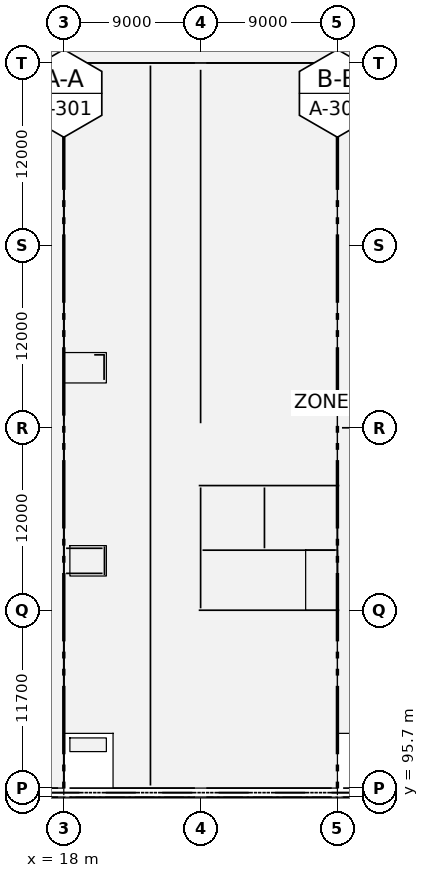
"""IFC4 building model, lengths in metres.
Left out: names, types, materials, properties, quantities, classifications, styles, units other than length and angle.
Written with IfcOpenShell. Run it as: python <this file> out.ifc"""

import sys

from ifc_helpers import new_model, si_unit, direction, frame, frame_2d, origin, origin_2d, place, context, subcontext, project, spatial, rectangle, extrude, element, fill, save


model = new_model("IFC4")
c1 = context("Model", 3, precision=1e-05, world=origin(), true_north=direction((0.0, 1.0)))
c2 = subcontext(c1, "Body", "Model", "MODEL_VIEW")
j1 = project(units=[si_unit("LENGTHUNIT", "METRE"), si_unit("PLANEANGLEUNIT", "RADIAN")], contexts=[c1])
p1 = place(None, origin())
s1 = spatial("IfcSite", under=j1, at=p1, CompositionType="ELEMENT")
p2 = place(p1, origin())
s2 = spatial("IfcBuilding", under=s1, at=p2, CompositionType="ELEMENT")
p3 = place(p2, origin())
s3 = spatial("IfcBuildingStorey", under=s2, at=p3, CompositionType="ELEMENT", Elevation=0.0)
p4 = place(p3, frame((18.0, 48.3, -0.5), z_axis=(0.0, 0.0, 1.0), x_axis=(0.0, 1.0, 0.0)))
e1 = element("IfcWall", 1, at=p4, inside=s3, PredefinedType="SOLIDWALL", context=c2, shape_type="SweptSolid", body=[
    extrude(rectangle(XDim=47.4, YDim=0.3, at=frame_2d((23.7, 0.0))), origin(), (0.0, 0.0, 1.0), 1.725),
])
p5 = place(p3, frame((18.0, 96.3, -0.5), z_axis=(0.0, 0.0, 1.0), x_axis=(0.0, 1.0, 0.0)))
e2 = element("IfcWall", 2, at=p5, inside=s3, PredefinedType="SOLIDWALL", context=c2, shape_type="SweptSolid", body=[
    extrude(rectangle(XDim=47.7, YDim=0.3, at=frame_2d((23.85, 0.0))), origin(), (0.0, 0.0, 1.0), 1.725),
])
for number, where, z_axis, x_axis in (
    (3, (18.0, 95.7, -0.5), (0.0, 0.0, 1.0), (1.0, 0.0, 0.0)),
    (4, (18.0, 96.3, -0.5), (0.0, 0.0, 1.0), (1.0, 0.0, 0.0)),
):
    element("IfcColumn", number, at=place(p3, frame(where, z_axis=z_axis, x_axis=x_axis)), inside=s3, PredefinedType="COLUMN", context=c2, shape_type="SweptSolid", body=[
        extrude(rectangle(XDim=0.75, YDim=0.55, at=origin_2d()), origin(), (0.0, 0.0, 1.0), 6.8),
    ])
for number, where, z_axis, x_axis in (
    (5, (18.0, 108.0, -0.5), (0.0, 0.0, 1.0), (1.0, 0.0, 0.0)),
    (6, (18.0, 120.0, -0.5), (0.0, 0.0, 1.0), (1.0, 0.0, 0.0)),
    (7, (18.0, 132.0, -0.5), (0.0, 0.0, 1.0), (1.0, 0.0, 0.0)),
    (8, (18.0, 144.0, -0.5), (0.0, 0.0, 1.0), (1.0, 0.0, 0.0)),
):
    element("IfcColumn", number, at=place(p3, frame(where, z_axis=z_axis, x_axis=x_axis)), inside=s3, PredefinedType="COLUMN", context=c2, shape_type="SweptSolid", body=[
        extrude(rectangle(XDim=0.75, YDim=0.75, at=origin_2d()), origin(), (0.0, 0.0, 1.0), 6.8),
    ])
for number, where, z_axis, x_axis in (
    (9, (27.0, 95.7, -0.5), (0.0, 0.0, 1.0), (1.0, 0.0, 0.0)),
    (10, (27.0, 96.3, -0.5), (0.0, 0.0, 1.0), (1.0, 0.0, 0.0)),
):
    element("IfcColumn", number, at=place(p3, frame(where, z_axis=z_axis, x_axis=x_axis)), inside=s3, PredefinedType="COLUMN", context=c2, shape_type="SweptSolid", body=[
        extrude(rectangle(XDim=0.75, YDim=0.55, at=origin_2d()), origin(), (0.0, 0.0, 1.0), 6.8),
    ])
for number, where, z_axis, x_axis in (
    (11, (27.0, 108.0, -0.5), (0.0, 0.0, 1.0), (1.0, 0.0, 0.0)),
    (12, (27.0, 120.0, -0.5), (0.0, 0.0, 1.0), (1.0, 0.0, 0.0)),
    (13, (27.0, 132.0, -0.5), (0.0, 0.0, 1.0), (1.0, 0.0, 0.0)),
    (14, (27.0, 144.0, -0.5), (0.0, 0.0, 1.0), (1.0, 0.0, 0.0)),
):
    element("IfcColumn", number, at=place(p3, frame(where, z_axis=z_axis, x_axis=x_axis)), inside=s3, PredefinedType="COLUMN", context=c2, shape_type="SweptSolid", body=[
        extrude(rectangle(XDim=0.75, YDim=0.75, at=origin_2d()), origin(), (0.0, 0.0, 1.0), 6.8),
    ])
for number, where, z_axis, x_axis in (
    (15, (36.0, 95.7, -0.5), (0.0, 0.0, 1.0), (1.0, 0.0, 0.0)),
    (16, (36.0, 96.3, -0.5), (0.0, 0.0, 1.0), (1.0, 0.0, 0.0)),
):
    element("IfcColumn", number, at=place(p3, frame(where, z_axis=z_axis, x_axis=x_axis)), inside=s3, PredefinedType="COLUMN", context=c2, shape_type="SweptSolid", body=[
        extrude(rectangle(XDim=0.75, YDim=0.55, at=origin_2d()), origin(), (0.0, 0.0, 1.0), 6.8),
    ])
for number, where, z_axis, x_axis in (
    (17, (36.0, 108.0, -0.5), (0.0, 0.0, 1.0), (1.0, 0.0, 0.0)),
    (18, (36.0, 120.0, -0.5), (0.0, 0.0, 1.0), (1.0, 0.0, 0.0)),
    (19, (36.0, 132.0, -0.5), (0.0, 0.0, 1.0), (1.0, 0.0, 0.0)),
    (20, (36.0, 144.0, -0.5), (0.0, 0.0, 1.0), (1.0, 0.0, 0.0)),
):
    element("IfcColumn", number, at=place(p3, frame(where, z_axis=z_axis, x_axis=x_axis)), inside=s3, PredefinedType="COLUMN", context=c2, shape_type="SweptSolid", body=[
        extrude(rectangle(XDim=0.75, YDim=0.75, at=origin_2d()), origin(), (0.0, 0.0, 1.0), 6.8),
    ])
p6 = place(p3, frame((9.375, 95.7, 1.225), z_axis=(0.0, 0.0, 1.0), x_axis=(1.0, 0.0, 0.0)))
e21 = element("IfcWall", 21, at=p6, inside=s3, PredefinedType="SOLIDWALL", context=c2, shape_type="SweptSolid", body=[
    extrude(rectangle(XDim=8.25, YDim=0.32, at=frame_2d((4.125, 0.0))), origin(), (0.0, 0.0, 1.0), 3.875),
])
p7 = place(p6, frame((1.85, 0.0, 0.685)))
e22 = element("IfcOpeningElement", 22, at=p7, cuts=e21, PredefinedType="OPENING", context=c2, shape_type="SweptSolid", body=[
    extrude(rectangle(XDim=1.8, YDim=3.15, at=frame_2d((0.9, 1.575))), frame((0.0, 0.17, 0.0), z_axis=(0.0, -1.0, 0.0), x_axis=(1.0, 0.0, 0.0)), (0.0, 0.0, 1.0), 0.34),
])
p8 = place(p6, frame((4.6, 0.0, 0.685)))
e23 = element("IfcOpeningElement", 23, at=p8, cuts=e21, PredefinedType="OPENING", context=c2, shape_type="SweptSolid", body=[
    extrude(rectangle(XDim=1.8, YDim=3.15, at=frame_2d((0.9, 1.575))), frame((0.0, 0.17, 0.0), z_axis=(0.0, -1.0, 0.0), x_axis=(1.0, 0.0, 0.0)), (0.0, 0.0, 1.0), 0.34),
])
p9 = place(p3, frame((9.375, 96.3, 1.225), z_axis=(0.0, 0.0, 1.0), x_axis=(1.0, 0.0, 0.0)))
e24 = element("IfcWall", 24, at=p9, inside=s3, PredefinedType="SOLIDWALL", context=c2, shape_type="SweptSolid", body=[
    extrude(rectangle(XDim=8.25, YDim=0.32, at=frame_2d((4.125, 0.0))), origin(), (0.0, 0.0, 1.0), 3.875),
])
p10 = place(p9, frame((1.85, 0.0, 0.685)))
e25 = element("IfcOpeningElement", 25, at=p10, cuts=e24, PredefinedType="OPENING", context=c2, shape_type="SweptSolid", body=[
    extrude(rectangle(XDim=1.8, YDim=3.15, at=frame_2d((0.9, 1.575))), frame((0.0, 0.17, 0.0), z_axis=(0.0, -1.0, 0.0), x_axis=(1.0, 0.0, 0.0)), (0.0, 0.0, 1.0), 0.34),
])
p11 = place(p9, frame((4.6, 0.0, 0.685)))
e26 = element("IfcOpeningElement", 26, at=p11, cuts=e24, PredefinedType="OPENING", context=c2, shape_type="SweptSolid", body=[
    extrude(rectangle(XDim=1.8, YDim=3.15, at=frame_2d((0.9, 1.575))), frame((0.0, 0.17, 0.0), z_axis=(0.0, -1.0, 0.0), x_axis=(1.0, 0.0, 0.0)), (0.0, 0.0, 1.0), 0.34),
])
p12 = place(p3, frame((9.35, 144.0, 1.225), z_axis=(0.0, 0.0, 1.0), x_axis=(1.0, 0.0, 0.0)))
e27 = element("IfcWall", 27, at=p12, inside=s3, PredefinedType="SOLIDWALL", context=c2, shape_type="SweptSolid", body=[
    extrude(rectangle(XDim=8.275, YDim=0.32, at=frame_2d((4.137, 0.0))), origin(), (0.0, 0.0, 1.0), 3.875),
])
p13 = place(p12, frame((1.858, 0.0, 0.685)))
e28 = element("IfcOpeningElement", 28, at=p13, cuts=e27, PredefinedType="OPENING", context=c2, shape_type="SweptSolid", body=[
    extrude(rectangle(XDim=1.8, YDim=3.15, at=frame_2d((0.9, 1.575))), frame((0.0, 0.17, 0.0), z_axis=(0.0, -1.0, 0.0), x_axis=(1.0, 0.0, 0.0)), (0.0, 0.0, 1.0), 0.34),
])
p14 = place(p12, frame((4.617, 0.0, 0.685)))
e29 = element("IfcOpeningElement", 29, at=p14, cuts=e27, PredefinedType="OPENING", context=c2, shape_type="SweptSolid", body=[
    extrude(rectangle(XDim=1.8, YDim=3.15, at=frame_2d((0.9, 1.575))), frame((0.0, 0.17, 0.0), z_axis=(0.0, -1.0, 0.0), x_axis=(1.0, 0.0, 0.0)), (0.0, 0.0, 1.0), 0.34),
])
for number, where, z_axis, x_axis in (
    (30, (18.375, 95.7, 0.0), (0.0, 0.0, 1.0), (1.0, 0.0, 0.0)),
    (31, (27.375, 95.7, 0.0), (0.0, 0.0, 1.0), (1.0, 0.0, 0.0)),
    (32, (36.375, 95.7, 0.0), (0.0, 0.0, 1.0), (1.0, 0.0, 0.0)),
):
    element("IfcWall", number, at=place(p3, frame(where, z_axis=z_axis, x_axis=x_axis)), inside=s3, PredefinedType="SOLIDWALL", context=c2, shape_type="SweptSolid", body=[
        extrude(rectangle(XDim=8.25, YDim=0.38, at=frame_2d((4.125, 0.0))), origin(), (0.0, 0.0, 1.0), 5.08),
    ])
p15 = place(p3, frame((18.375, 96.3, 0.0), z_axis=(0.0, 0.0, 1.0), x_axis=(1.0, 0.0, 0.0)))
e33 = element("IfcWall", 33, at=p15, inside=s3, PredefinedType="SOLIDWALL", context=c2, shape_type="SweptSolid", body=[
    extrude(rectangle(XDim=8.25, YDim=0.38, at=frame_2d((4.125, 0.0))), origin(), (0.0, 0.0, 1.0), 5.08),
])
p16 = place(p15, frame((3.325, 0.0, 3.59)))
e34 = element("IfcOpeningElement", 34, at=p16, cuts=e33, PredefinedType="OPENING", context=c2, shape_type="SweptSolid", body=[
    extrude(rectangle(XDim=1.6, YDim=1.45, at=frame_2d((0.8, 0.725))), frame((0.0, 0.2, 0.0), z_axis=(0.0, -1.0, 0.0), x_axis=(1.0, 0.0, 0.0)), (0.0, 0.0, 1.0), 0.4),
])
p17 = place(p3, frame((27.375, 96.3, 0.0), z_axis=(0.0, 0.0, 1.0), x_axis=(1.0, 0.0, 0.0)))
e35 = element("IfcWall", 35, at=p17, inside=s3, PredefinedType="SOLIDWALL", context=c2, shape_type="SweptSolid", body=[
    extrude(rectangle(XDim=8.25, YDim=0.38, at=frame_2d((4.125, 0.0))), origin(), (0.0, 0.0, 1.0), 5.08),
])
p18 = place(p3, frame((36.375, 96.3, 0.0), z_axis=(0.0, 0.0, 1.0), x_axis=(1.0, 0.0, 0.0)))
e36 = element("IfcWall", 36, at=p18, inside=s3, PredefinedType="SOLIDWALL", context=c2, shape_type="SweptSolid", body=[
    extrude(rectangle(XDim=8.25, YDim=0.38, at=frame_2d((4.125, 0.0))), origin(), (0.0, 0.0, 1.0), 5.08),
])
p19 = place(p18, frame((3.325, 0.0, 3.34)))
e37 = element("IfcOpeningElement", 37, at=p19, cuts=e36, PredefinedType="OPENING", context=c2, shape_type="SweptSolid", body=[
    extrude(rectangle(XDim=1.6, YDim=1.45, at=frame_2d((0.8, 0.725))), frame((0.0, 0.2, 0.0), z_axis=(0.0, -1.0, 0.0), x_axis=(1.0, 0.0, 0.0)), (0.0, 0.0, 1.0), 0.4),
])
for number, where, z_axis, x_axis in (
    (38, (18.375, 144.0, 0.0), (0.0, 0.0, 1.0), (1.0, 0.0, 0.0)),
    (39, (27.375, 144.0, 0.0), (0.0, 0.0, 1.0), (1.0, 0.0, 0.0)),
    (40, (36.375, 144.0, 0.0), (0.0, 0.0, 1.0), (1.0, 0.0, 0.0)),
):
    element("IfcWall", number, at=place(p3, frame(where, z_axis=z_axis, x_axis=x_axis)), inside=s3, PredefinedType="SOLIDWALL", context=c2, shape_type="SweptSolid", body=[
        extrude(rectangle(XDim=8.25, YDim=0.38, at=frame_2d((4.125, 0.0))), origin(), (0.0, 0.0, 1.0), 5.08),
    ])
for number, where, z_axis, x_axis in (
    (41, (26.875, 108.0, -0.5), (0.0, 0.0, 1.0), (1.0, 0.0, 0.0)),
    (42, (26.875, 116.2, -0.5), (0.0, 0.0, 1.0), (1.0, 0.0, 0.0)),
):
    element("IfcWall", number, at=place(p3, frame(where, z_axis=z_axis, x_axis=x_axis)), inside=s3, PredefinedType="SOLIDWALL", context=c2, shape_type="SweptSolid", body=[
        extrude(rectangle(XDim=9.25, YDim=0.25, at=frame_2d((4.625, 0.0))), origin(), (0.0, 0.0, 1.0), 6.8),
    ])
p20 = place(p3, frame((27.0, 108.125, -0.5), z_axis=(0.0, 0.0, 1.0), x_axis=(0.0, 1.0, 0.0)))
e43 = element("IfcWall", 43, at=p20, inside=s3, PredefinedType="SOLIDWALL", context=c2, shape_type="SweptSolid", body=[
    extrude(rectangle(XDim=7.95, YDim=0.25, at=frame_2d((3.975, 0.0))), origin(), (0.0, 0.0, 1.0), 6.8),
])
p21 = place(p20, frame((1.15, 0.0, 0.5)))
e44 = element("IfcOpeningElement", 44, at=p21, cuts=e43, PredefinedType="OPENING", context=c2, shape_type="SweptSolid", body=[
    extrude(rectangle(XDim=1.2, YDim=2.2, at=frame_2d((0.6, 1.1))), frame((0.0, 0.135, 0.0), z_axis=(0.0, -1.0, 0.0), x_axis=(1.0, 0.0, 0.0)), (0.0, 0.0, 1.0), 0.27),
])
p22 = place(p3, frame((36.0, 108.125, -0.5), z_axis=(0.0, 0.0, 1.0), x_axis=(0.0, 1.0, 0.0)))
e45 = element("IfcWall", 45, at=p22, inside=s3, PredefinedType="SOLIDWALL", context=c2, shape_type="SweptSolid", body=[
    extrude(rectangle(XDim=7.95, YDim=0.25, at=frame_2d((3.975, 0.0))), origin(), (0.0, 0.0, 1.0), 6.8),
])
p23 = place(p22, frame((4.9, 0.0, 0.5)))
e46 = element("IfcOpeningElement", 46, at=p23, cuts=e45, PredefinedType="OPENING", context=c2, shape_type="SweptSolid", body=[
    extrude(rectangle(XDim=1.6, YDim=2.2, at=frame_2d((0.8, 1.1))), frame((0.0, 0.135, 0.0), z_axis=(0.0, -1.0, 0.0), x_axis=(1.0, 0.0, 0.0)), (0.0, 0.0, 1.0), 0.27),
])
p24 = place(p3, frame((27.125, 111.95, -0.5), z_axis=(0.0, 0.0, 1.0), x_axis=(1.0, 0.0, 0.0)))
e47 = element("IfcWall", 47, at=p24, inside=s3, PredefinedType="SOLIDWALL", context=c2, shape_type="SweptSolid", body=[
    extrude(rectangle(XDim=8.75, YDim=0.25, at=frame_2d((4.375, 0.0))), origin(), (0.0, 0.0, 1.0), 6.8),
])
p25 = place(p3, frame((31.2, 112.075, -0.5), z_axis=(0.0, 0.0, 1.0), x_axis=(0.0, 1.0, 0.0)))
e48 = element("IfcWall", 48, at=p25, inside=s3, PredefinedType="SOLIDWALL", context=c2, shape_type="SweptSolid", body=[
    extrude(rectangle(XDim=4.0, YDim=0.25, at=frame_2d((2.0, 0.0))), origin(), (0.0, 0.0, 1.0), 6.8),
])
p26 = place(p25, frame((1.2, 0.0, 0.5)))
e49 = element("IfcOpeningElement", 49, at=p26, cuts=e48, PredefinedType="OPENING", context=c2, shape_type="SweptSolid", body=[
    extrude(rectangle(XDim=1.6, YDim=2.4, at=frame_2d((0.8, 1.2))), frame((0.0, 0.135, 0.0), z_axis=(0.0, -1.0, 0.0), x_axis=(1.0, 0.0, 0.0)), (0.0, 0.0, 1.0), 0.27),
])
p27 = place(p3, frame((20.675, 110.3, 0.0), z_axis=(0.0, 0.0, 1.0), x_axis=(0.0, 1.0, 0.0)))
e50 = element("IfcWall", 50, at=p27, inside=s3, PredefinedType="SOLIDWALL", context=c2, shape_type="SweptSolid", body=[
    extrude(rectangle(XDim=1.9, YDim=0.25, at=frame_2d((0.95, 0.0))), origin(), (0.0, 0.0, 1.0), 0.025),
])
for number, where, z_axis, x_axis in (
    (51, (18.15, 110.425, 0.0), (0.0, 0.0, 1.0), (1.0, 0.0, 0.0)),
    (52, (18.15, 112.075, 0.0), (0.0, 0.0, 1.0), (1.0, 0.0, 0.0)),
):
    element("IfcWall", number, at=place(p3, frame(where, z_axis=z_axis, x_axis=x_axis)), inside=s3, PredefinedType="SOLIDWALL", context=c2, shape_type="SweptSolid", body=[
        extrude(rectangle(XDim=2.4, YDim=0.25, at=frame_2d((1.2, 0.0))), origin(), (0.0, 0.0, 1.0), 0.025),
    ])
p28 = place(p3, frame((20.65, 123.15, -0.5), z_axis=(0.0, 0.0, 1.0), x_axis=(0.0, 1.0, 0.0)))
e53 = element("IfcWall", 53, at=p28, inside=s3, PredefinedType="SOLIDWALL", context=c2, shape_type="SweptSolid", body=[
    extrude(rectangle(XDim=1.65, YDim=0.25, at=frame_2d((0.825, 0.0))), origin(), (0.0, 0.0, 1.0), 1.325),
])
p29 = place(p3, frame((20.0, 124.8, -0.5), z_axis=(0.0, 0.0, 1.0), x_axis=(1.0, 0.0, 0.0)))
e54 = element("IfcWall", 54, at=p29, inside=s3, PredefinedType="SOLIDWALL", context=c2, shape_type="SweptSolid", body=[
    extrude(rectangle(XDim=0.7, YDim=0.25, at=frame_2d((0.35, 0.0))), origin(), (0.0, 0.0, 1.0), 1.325),
])
p30 = place(p3, frame((18.0, 96.72, 1.225), z_axis=(0.0, 0.0, 1.0), x_axis=(0.0, 1.0, 0.0)))
e55 = element("IfcWall", 55, at=p30, inside=s3, PredefinedType="STANDARD", context=c2, shape_type="SweptSolid", body=[
    extrude(rectangle(XDim=10.86, YDim=0.255, at=frame_2d((5.43, 0.0))), origin(), (0.0, 0.0, 1.0), 3.605),
])
p31 = place(p3, frame((18.0, 108.42, 1.225), z_axis=(0.0, 0.0, 1.0), x_axis=(0.0, 1.0, 0.0)))
e56 = element("IfcWall", 56, at=p31, inside=s3, PredefinedType="STANDARD", context=c2, shape_type="SweptSolid", body=[
    extrude(rectangle(XDim=11.16, YDim=0.255, at=frame_2d((5.58, 0.0))), origin(), (0.0, 0.0, 1.0), 3.605),
])
p32 = place(p31, frame((1.43, 0.0, 0.0)))
e57 = element("IfcOpeningElement", 57, at=p32, cuts=e56, PredefinedType="OPENING", context=c2, shape_type="SweptSolid", body=[
    extrude(rectangle(XDim=1.8, YDim=2.3, at=frame_2d((0.9, 1.15))), frame((0.0, 0.137, 0.0), z_axis=(0.0, -1.0, 0.0), x_axis=(1.0, 0.0, 0.0)), (0.0, 0.0, 1.0), 0.275),
])
for number, where, z_axis, x_axis in (
    (58, (18.0, 120.42, 1.225), (0.0, 0.0, 1.0), (0.0, 1.0, 0.0)),
    (59, (18.0, 132.42, 1.225), (0.0, 0.0, 1.0), (0.0, 1.0, 0.0)),
):
    element("IfcWall", number, at=place(p3, frame(where, z_axis=z_axis, x_axis=x_axis)), inside=s3, PredefinedType="STANDARD", context=c2, shape_type="SweptSolid", body=[
        extrude(rectangle(XDim=11.16, YDim=0.255, at=frame_2d((5.58, 0.0))), origin(), (0.0, 0.0, 1.0), 3.605),
    ])
p33 = place(p3, frame((23.7, 96.47, 0.0), z_axis=(0.0, 0.0, 1.0), x_axis=(0.0, 1.0, 0.0)))
e60 = element("IfcWall", 60, at=p33, inside=s3, PredefinedType="PARTITIONING", context=c2, shape_type="SweptSolid", body=[
    extrude(rectangle(XDim=47.36, YDim=0.125, at=frame_2d((23.68, 0.0))), origin(), (0.0, 0.0, 1.0), 5.95),
])
p34 = place(p33, frame((17.02, 0.0, 0.0)))
e61 = element("IfcOpeningElement", 61, at=p34, cuts=e60, PredefinedType="OPENING", context=c2, shape_type="SweptSolid", body=[
    extrude(rectangle(XDim=1.02, YDim=2.18, at=frame_2d((0.51, 1.09))), frame((0.0, 0.073, 0.0), z_axis=(0.0, -1.0, 0.0), x_axis=(1.0, 0.0, 0.0)), (0.0, 0.0, 1.0), 0.145),
])
p35 = place(p3, frame((27.0, 120.3, 0.0), z_axis=(0.0, 0.0, 1.0), x_axis=(0.0, 1.0, 0.0)))
e62 = element("IfcWall", 62, at=p35, inside=s3, PredefinedType="STANDARD", context=c2, shape_type="SweptSolid", body=[
    extrude(rectangle(XDim=23.25, YDim=0.21, at=frame_2d((11.625, 0.0))), origin(), (0.0, 0.0, 1.0), 4.83),
])
p36 = place(p35, frame((4.92, 0.0, 0.0)))
e63 = element("IfcOpeningElement", 63, at=p36, cuts=e62, PredefinedType="OPENING", context=c2, shape_type="SweptSolid", body=[
    extrude(rectangle(XDim=1.86, YDim=2.45, at=frame_2d((0.93, 1.225))), frame((0.0, 0.115, 0.0), z_axis=(0.0, -1.0, 0.0), x_axis=(1.0, 0.0, 0.0)), (0.0, 0.0, 1.0), 0.23),
])
p37 = place(p3, frame((36.3, 120.0, 0.0), z_axis=(0.0, 0.0, 1.0), x_axis=(1.0, 0.0, 0.0)))
e64 = element("IfcWall", 64, at=p37, inside=s3, PredefinedType="STANDARD", context=c2, shape_type="SweptSolid", body=[
    extrude(rectangle(XDim=17.4, YDim=0.21, at=frame_2d((8.7, 0.0))), origin(), (0.0, 0.0, 1.0), 5.13),
])
p38 = place(p37, frame((3.35, 0.0, 0.0)))
e65 = element("IfcOpeningElement", 65, at=p38, cuts=e64, PredefinedType="OPENING", context=c2, shape_type="SweptSolid", body=[
    extrude(rectangle(XDim=2.0, YDim=2.5, at=frame_2d((1.0, 1.25))), frame((0.0, 0.115, 0.0), z_axis=(0.0, -1.0, 0.0), x_axis=(1.0, 0.0, 0.0)), (0.0, 0.0, 1.0), 0.23),
])
p39 = place(p16, origin())
e66 = element("IfcWindow", 66, at=p39, inside=s3, PartitioningType="DOUBLE_PANEL_HORIZONTAL", PredefinedType="WINDOW", context=c2, shape_type="SweptSolid", body=[
    extrude(rectangle(XDim=1.6, YDim=1.45, at=frame_2d((0.8, 0.725))), frame((0.0, 0.03, 0.0), z_axis=(0.0, -1.0, 0.0), x_axis=(1.0, 0.0, 0.0)), (0.0, 0.0, 1.0), 0.06),
])
fill(e34, e66)
p40 = place(p26, origin())
e67 = element("IfcDoor", 67, at=p40, inside=s3, OperationType="SLIDING_TO_LEFT", PredefinedType="DOOR", context=c2, shape_type="SweptSolid", body=[
    extrude(rectangle(XDim=1.6, YDim=2.4, at=frame_2d((0.8, 1.2))), frame((0.0, 0.025, 0.0), z_axis=(0.0, -1.0, 0.0), x_axis=(1.0, 0.0, 0.0)), (0.0, 0.0, 1.0), 0.05),
])
fill(e49, e67)
p41 = place(p21, origin())
e68 = element("IfcDoor", 68, at=p41, inside=s3, OperationType="SINGLE_SWING_LEFT", PredefinedType="DOOR", context=c2, shape_type="SweptSolid", body=[
    extrude(rectangle(XDim=1.2, YDim=2.2, at=frame_2d((0.6, 1.1))), frame((0.0, 0.025, 0.0), z_axis=(0.0, -1.0, 0.0), x_axis=(1.0, 0.0, 0.0)), (0.0, 0.0, 1.0), 0.05),
])
fill(e44, e68)
p42 = place(p23, origin())
e69 = element("IfcDoor", 69, at=p42, inside=s3, OperationType="SINGLE_SWING_RIGHT", PredefinedType="DOOR", context=c2, shape_type="SweptSolid", body=[
    extrude(rectangle(XDim=1.6, YDim=2.2, at=frame_2d((0.8, 1.1))), frame((0.0, 0.025, 0.0), z_axis=(0.0, -1.0, 0.0), x_axis=(1.0, 0.0, 0.0)), (0.0, 0.0, 1.0), 0.05),
])
fill(e46, e69)
p43 = place(p32, origin())
e70 = element("IfcDoor", 70, at=p43, inside=s3, OperationType="SINGLE_SWING_LEFT", PredefinedType="DOOR", context=c2, shape_type="SweptSolid", body=[
    extrude(rectangle(XDim=1.8, YDim=2.3, at=frame_2d((0.9, 1.15))), frame((0.0, 0.025, 0.0), z_axis=(0.0, -1.0, 0.0), x_axis=(1.0, 0.0, 0.0)), (0.0, 0.0, 1.0), 0.05),
])
fill(e57, e70)
p44 = place(p34, origin())
e71 = element("IfcDoor", 71, at=p44, inside=s3, OperationType="SINGLE_SWING_LEFT", PredefinedType="DOOR", context=c2, shape_type="SweptSolid", body=[
    extrude(rectangle(XDim=1.02, YDim=2.18, at=frame_2d((0.51, 1.09))), frame((0.0, 0.025, 0.0), z_axis=(0.0, -1.0, 0.0), x_axis=(1.0, 0.0, 0.0)), (0.0, 0.0, 1.0), 0.05),
])
fill(e61, e71)
p45 = place(p36, origin())
e72 = element("IfcDoor", 72, at=p45, inside=s3, OperationType="SLIDING_TO_LEFT", PredefinedType="DOOR", context=c2, shape_type="SweptSolid", body=[
    extrude(rectangle(XDim=1.86, YDim=2.45, at=frame_2d((0.93, 1.225))), frame((0.0, 0.025, 0.0), z_axis=(0.0, -1.0, 0.0), x_axis=(1.0, 0.0, 0.0)), (0.0, 0.0, 1.0), 0.05),
])
fill(e63, e72)
save(model, sys.argv[1])
